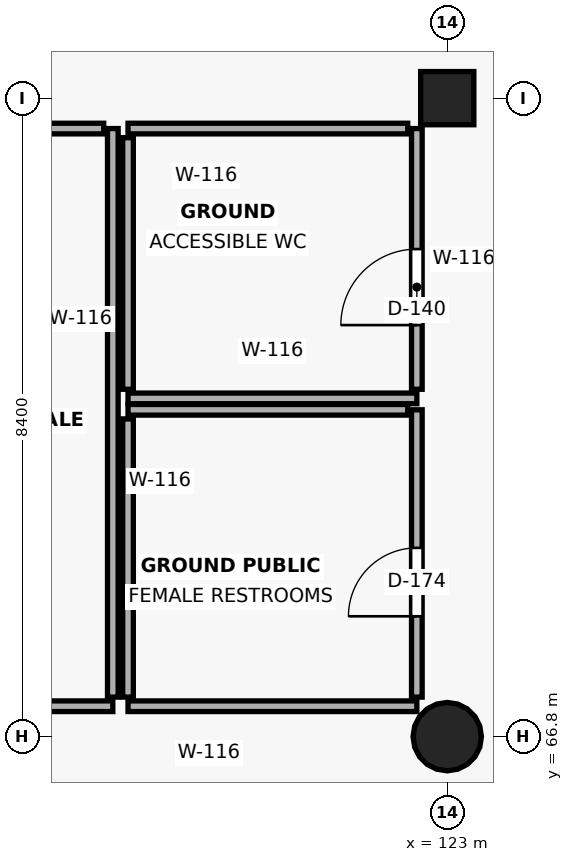
"""IFC4 building model, lengths in metres.
Left out: names, types, materials, properties, quantities, classifications, styles, units other than length and angle.
Written with IfcOpenShell. Run it as: python <this file> out.ifc"""

import sys

from ifc_helpers import new_model, si_unit, direction, frame, frame_2d, origin, origin_2d, place, context, subcontext, project, spatial, rectangle, circle, extrude, element, fill, save


model = new_model("IFC4")
c1 = context("Model", 3, precision=1e-05, world=origin(), true_north=direction((0.0, 1.0)))
c2 = subcontext(c1, "Body", "Model", "MODEL_VIEW")
j1 = project(units=[si_unit("LENGTHUNIT", "METRE"), si_unit("PLANEANGLEUNIT", "RADIAN")], contexts=[c1])
p1 = place(None, origin())
s1 = spatial("IfcSite", under=j1, at=p1, CompositionType="ELEMENT")
p2 = place(p1, origin())
s2 = spatial("IfcBuilding", under=s1, at=p2, CompositionType="ELEMENT")
p3 = place(p2, origin())
s3 = spatial("IfcBuildingStorey", under=s2, at=p3, CompositionType="ELEMENT", Elevation=0.0)
p4 = place(p3, frame((123.0, 66.8, 0.0), z_axis=(0.0, 0.0, 1.0), x_axis=(1.0, 0.0, 0.0)))
e1 = element("IfcColumn", 1, at=p4, inside=s3, PredefinedType="COLUMN", context=c2, shape_type="SweptSolid", body=[
    extrude(circle(Radius=0.45, at=origin_2d()), origin(), (0.0, 0.0, 1.0), 5.1),
])
p5 = place(p3, frame((123.0, 75.2, 0.0), z_axis=(0.0, 0.0, 1.0), x_axis=(1.0, 0.0, 0.0)))
e2 = element("IfcColumn", 2, at=p5, inside=s3, PredefinedType="COLUMN", context=c2, shape_type="SweptSolid", body=[
    extrude(rectangle(XDim=0.7, YDim=0.7, at=origin_2d()), origin(), (0.0, 0.0, 1.0), 5.1),
])
p6 = place(p3, frame((114.6, 67.2, 0.0), z_axis=(0.0, 0.0, 1.0), x_axis=(1.0, 0.0, 0.0)))
e3 = element("IfcWall", 3, at=p6, inside=s3, PredefinedType="PLUMBINGWALL", context=c2, shape_type="SweptSolid", body=[
    extrude(rectangle(XDim=4.0, YDim=0.14, at=frame_2d((2.0, 0.0))), origin(), (0.0, 0.0, 1.0), 4.8),
])
p7 = place(p6, frame((1.15, 0.0, 0.0)))
e4 = element("IfcOpeningElement", 4, at=p7, cuts=e3, PredefinedType="OPENING", context=c2, shape_type="SweptSolid", body=[
    extrude(rectangle(XDim=0.9, YDim=2.15, at=frame_2d((0.45, 1.075))), frame((0.0, 0.082, 0.0), z_axis=(0.0, -1.0, 0.0), x_axis=(1.0, 0.0, 0.0)), (0.0, 0.0, 1.0), 0.164),
])
p8 = place(p3, frame((118.6, 67.32, 0.0), z_axis=(0.0, 0.0, 1.0), x_axis=(0.0, 1.0, 0.0)))
e5 = element("IfcWall", 5, at=p8, inside=s3, PredefinedType="PLUMBINGWALL", context=c2, shape_type="SweptSolid", body=[
    extrude(rectangle(XDim=7.48, YDim=0.14, at=frame_2d((3.74, 0.0))), origin(), (0.0, 0.0, 1.0), 4.8),
])
p9 = place(p3, frame((118.48, 74.8, 0.0), z_axis=(0.0, 0.0, 1.0), x_axis=(-1.0, 0.0, 0.0)))
e6 = element("IfcWall", 6, at=p9, inside=s3, PredefinedType="PLUMBINGWALL", context=c2, shape_type="SweptSolid", body=[
    extrude(rectangle(XDim=3.88, YDim=0.14, at=frame_2d((1.94, 0.0))), origin(), (0.0, 0.0, 1.0), 4.8),
])
p10 = place(p3, frame((118.8, 67.2, 0.0), z_axis=(0.0, 0.0, 1.0), x_axis=(1.0, 0.0, 0.0)))
e7 = element("IfcWall", 7, at=p10, inside=s3, PredefinedType="PLUMBINGWALL", context=c2, shape_type="SweptSolid", body=[
    extrude(rectangle(XDim=3.8, YDim=0.14, at=frame_2d((1.9, 0.0))), origin(), (0.0, 0.0, 1.0), 4.8),
])
p11 = place(p3, frame((122.6, 67.32, 0.0), z_axis=(0.0, 0.0, 1.0), x_axis=(0.0, 1.0, 0.0)))
e8 = element("IfcWall", 8, at=p11, inside=s3, PredefinedType="PLUMBINGWALL", context=c2, shape_type="SweptSolid", body=[
    extrude(rectangle(XDim=3.78, YDim=0.14, at=frame_2d((1.89, 0.0))), origin(), (0.0, 0.0, 1.0), 4.8),
])
p12 = place(p11, frame((1.063, 0.0, 0.0)))
e9 = element("IfcOpeningElement", 9, at=p12, cuts=e8, PredefinedType="OPENING", context=c2, shape_type="SweptSolid", body=[
    extrude(rectangle(XDim=0.9, YDim=2.15, at=frame_2d((0.45, 1.075))), frame((0.0, 0.082, 0.0), z_axis=(0.0, -1.0, 0.0), x_axis=(1.0, 0.0, 0.0)), (0.0, 0.0, 1.0), 0.164),
])
p13 = place(p3, frame((122.48, 71.1, 0.0), z_axis=(0.0, 0.0, 1.0), x_axis=(-1.0, 0.0, 0.0)))
e10 = element("IfcWall", 10, at=p13, inside=s3, PredefinedType="PLUMBINGWALL", context=c2, shape_type="SweptSolid", body=[
    extrude(rectangle(XDim=3.68, YDim=0.14, at=frame_2d((1.84, 0.0))), origin(), (0.0, 0.0, 1.0), 4.8),
])
p14 = place(p3, frame((118.8, 70.98, 0.0), z_axis=(0.0, 0.0, 1.0), x_axis=(0.0, -1.0, 0.0)))
e11 = element("IfcWall", 11, at=p14, inside=s3, PredefinedType="PLUMBINGWALL", context=c2, shape_type="SweptSolid", body=[
    extrude(rectangle(XDim=3.66, YDim=0.14, at=frame_2d((1.83, 0.0))), origin(), (0.0, 0.0, 1.0), 4.8),
])
p15 = place(p3, frame((118.8, 71.25, 0.0), z_axis=(0.0, 0.0, 1.0), x_axis=(1.0, 0.0, 0.0)))
e12 = element("IfcWall", 12, at=p15, inside=s3, PredefinedType="PLUMBINGWALL", context=c2, shape_type="SweptSolid", body=[
    extrude(rectangle(XDim=3.8, YDim=0.14, at=frame_2d((1.9, 0.0))), origin(), (0.0, 0.0, 1.0), 4.8),
])
p16 = place(p3, frame((122.6, 71.37, 0.0), z_axis=(0.0, 0.0, 1.0), x_axis=(0.0, 1.0, 0.0)))
e13 = element("IfcWall", 13, at=p16, inside=s3, PredefinedType="PLUMBINGWALL", context=c2, shape_type="SweptSolid", body=[
    extrude(rectangle(XDim=3.43, YDim=0.14, at=frame_2d((1.715, 0.0))), origin(), (0.0, 0.0, 1.0), 4.8),
])
p17 = place(p16, frame((0.844, 0.0, 0.0)))
e14 = element("IfcOpeningElement", 14, at=p17, cuts=e13, PredefinedType="OPENING", context=c2, shape_type="SweptSolid", body=[
    extrude(rectangle(XDim=1.0, YDim=2.15, at=frame_2d((0.5, 1.075))), frame((0.0, 0.082, 0.0), z_axis=(0.0, -1.0, 0.0), x_axis=(1.0, 0.0, 0.0)), (0.0, 0.0, 1.0), 0.164),
])
p18 = place(p3, frame((122.48, 74.8, 0.0), z_axis=(0.0, 0.0, 1.0), x_axis=(-1.0, 0.0, 0.0)))
e15 = element("IfcWall", 15, at=p18, inside=s3, PredefinedType="PLUMBINGWALL", context=c2, shape_type="SweptSolid", body=[
    extrude(rectangle(XDim=3.68, YDim=0.14, at=frame_2d((1.84, 0.0))), origin(), (0.0, 0.0, 1.0), 4.8),
])
p19 = place(p3, frame((118.8, 74.68, 0.0), z_axis=(0.0, 0.0, 1.0), x_axis=(0.0, -1.0, 0.0)))
e16 = element("IfcWall", 16, at=p19, inside=s3, PredefinedType="PLUMBINGWALL", context=c2, shape_type="SweptSolid", body=[
    extrude(rectangle(XDim=3.31, YDim=0.14, at=frame_2d((1.655, 0.0))), origin(), (0.0, 0.0, 1.0), 4.8),
])
p20 = place(p12, origin())
e17 = element("IfcDoor", 17, at=p20, inside=s3, OperationType="SINGLE_SWING_LEFT", PredefinedType="DOOR", context=c2, shape_type="SweptSolid", body=[
    extrude(rectangle(XDim=0.9, YDim=2.15, at=frame_2d((0.45, 1.075))), frame((0.0, 0.025, 0.0), z_axis=(0.0, -1.0, 0.0), x_axis=(1.0, 0.0, 0.0)), (0.0, 0.0, 1.0), 0.05),
])
fill(e9, e17)
p21 = place(p17, origin())
e18 = element("IfcDoor", 18, at=p21, inside=s3, OperationType="SINGLE_SWING_LEFT", PredefinedType="DOOR", context=c2, shape_type="SweptSolid", body=[
    extrude(rectangle(XDim=1.0, YDim=2.15, at=frame_2d((0.5, 1.075))), frame((0.0, 0.025, 0.0), z_axis=(0.0, -1.0, 0.0), x_axis=(1.0, 0.0, 0.0)), (0.0, 0.0, 1.0), 0.05),
])
fill(e14, e18)
save(model, sys.argv[1])
